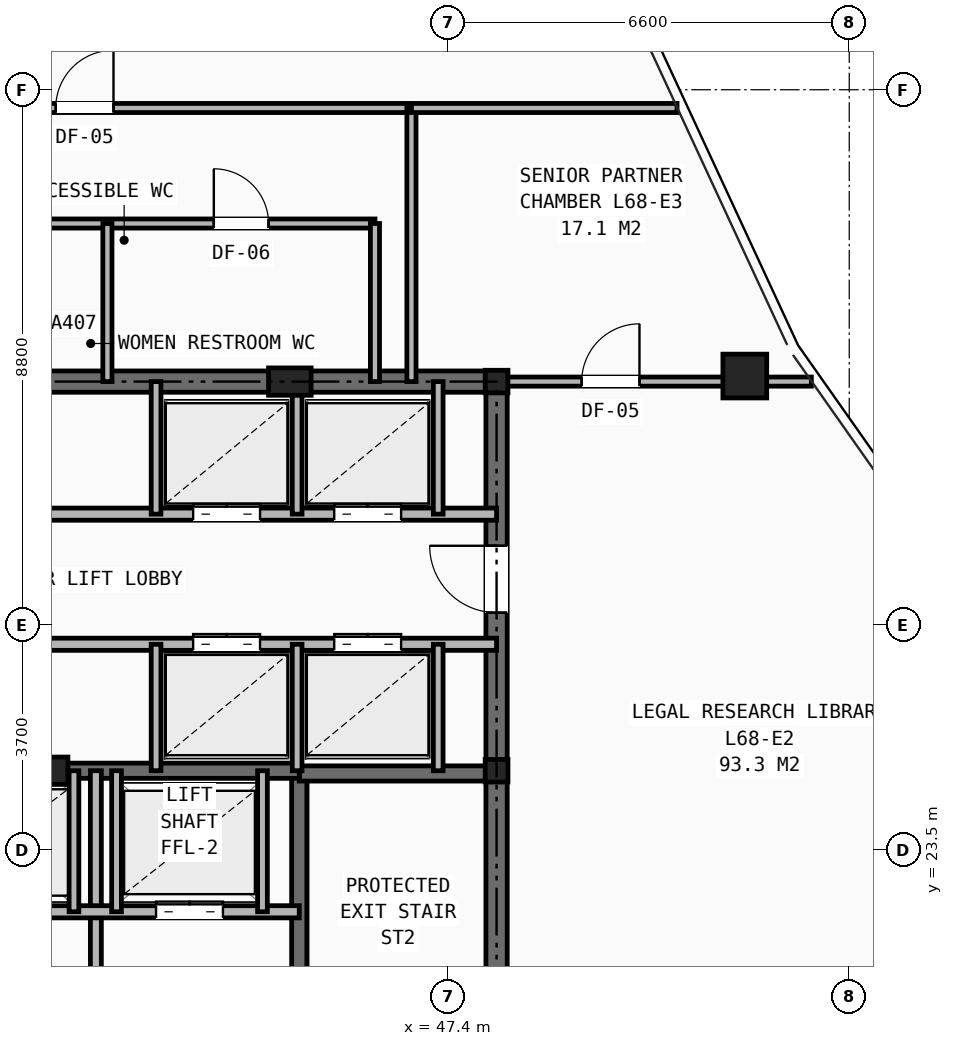
"""IFC4 building model, lengths in metres.
Left out: names, types, materials, properties, quantities, classifications, styles, units other than length and angle.
Written with IfcOpenShell. Run it as: python <this file> out.ifc"""

import sys

from ifc_helpers import new_model, si_unit, direction, frame, frame_2d, origin, origin_2d, place, context, subcontext, project, spatial, rectangle, hollow_rectangle, i_section, extrude, element, fill, save


model = new_model("IFC4")
c1 = context("Model", 3, precision=1e-05, world=origin(), true_north=direction((0.0, 1.0)))
c2 = subcontext(c1, "Body", "Model", "MODEL_VIEW")
j1 = project(units=[si_unit("LENGTHUNIT", "METRE"), si_unit("PLANEANGLEUNIT", "RADIAN")], contexts=[c1])
p1 = place(None, origin())
s1 = spatial("IfcSite", under=j1, at=p1, CompositionType="ELEMENT")
p2 = place(p1, origin())
s2 = spatial("IfcBuilding", under=s1, at=p2, CompositionType="ELEMENT")
p3 = place(p2, frame((0.0, 0.0, 239.9)))
s3 = spatial("IfcBuildingStorey", under=s2, at=p3, CompositionType="ELEMENT", Elevation=239.9)
for number, where, z_axis, x_axis in (
    (1, (48.2, 24.8, 0.0), (0.0, 0.0, 1.0), (1.0, 0.0, 0.0)),
    (2, (48.2, 31.2, 0.0), (0.0, 0.0, 1.0), (1.0, 0.0, 0.0)),
):
    element("IfcColumn", number, at=place(p3, frame(where, z_axis=z_axis, x_axis=x_axis)), inside=s3, PredefinedType="COLUMN", context=c2, shape_type="SweptSolid", body=[
        extrude(i_section(OverallWidth=0.374, OverallDepth=0.372, WebThickness=0.016, FlangeThickness=0.026, at=origin_2d()), origin(), (0.0, 0.0, 1.0), 3.5),
    ])
for number, where, z_axis, x_axis in (
    (3, (44.8, 31.2, 0.0), (0.0, 0.0, 1.0), (1.0, 0.0, 0.0)),
    (4, (40.8, 24.8, 0.0), (0.0, 0.0, 1.0), (1.0, 0.0, 0.0)),
):
    element("IfcColumn", number, at=place(p3, frame(where, z_axis=z_axis, x_axis=x_axis)), inside=s3, PredefinedType="PILASTER", context=c2, shape_type="SweptSolid", body=[
        extrude(rectangle(XDim=0.7, YDim=0.45, at=origin_2d()), origin(), (0.0, 0.0, 1.0), 3.5),
    ])
p4 = place(p3, frame((52.282, 31.291, 0.0), z_axis=(0.0, 0.0, 1.0), x_axis=(1.0, 0.0, 0.0)))
e5 = element("IfcColumn", 5, at=p4, inside=s3, PredefinedType="COLUMN", context=c2, shape_type="SweptSolid", body=[
    extrude(hollow_rectangle(XDim=0.72, YDim=0.72, WallThickness=0.05, at=origin_2d()), origin(), (0.0, 0.0, 1.0), 3.5),
])
p5 = place(p3, frame((31.8, 31.2, 0.0), z_axis=(0.0, 0.0, 1.0), x_axis=(1.0, 0.0, 0.0)))
e6 = element("IfcWall", 6, at=p5, inside=s3, PredefinedType="SHEAR", context=c2, shape_type="SweptSolid", body=[
    extrude(rectangle(XDim=16.4, YDim=0.35, at=frame_2d((8.2, 0.0))), origin(), (0.0, 0.0, 1.0), 3.25),
])
p6 = place(p3, frame((48.2, 16.4, 0.0), z_axis=(0.0, 0.0, 1.0), x_axis=(0.0, 1.0, 0.0)))
e7 = element("IfcWall", 7, at=p6, inside=s3, PredefinedType="SHEAR", context=c2, shape_type="SweptSolid", body=[
    extrude(rectangle(XDim=14.8, YDim=0.35, at=frame_2d((7.4, 0.0))), origin(), (0.0, 0.0, 1.0), 3.25),
])
p7 = place(p6, frame((11.0, 0.0, 0.0)))
e8 = element("IfcOpeningElement", 8, at=p7, cuts=e7, PredefinedType="OPENING", context=c2, shape_type="SweptSolid", body=[
    extrude(rectangle(XDim=1.1, YDim=2.15, at=frame_2d((0.55, 1.075))), frame((0.0, 0.185, 0.0), z_axis=(0.0, -1.0, 0.0), x_axis=(1.0, 0.0, 0.0)), (0.0, 0.0, 1.0), 0.37),
])
p8 = place(p3, frame((44.955, 16.4, 0.0), z_axis=(0.0, 0.0, 1.0), x_axis=(0.0, 1.0, 0.0)))
e9 = element("IfcWall", 9, at=p8, inside=s3, PredefinedType="SHEAR", context=c2, shape_type="SweptSolid", body=[
    extrude(rectangle(XDim=8.4, YDim=0.25, at=frame_2d((4.2, 0.0))), origin(), (0.0, 0.0, 1.0), 3.25),
])
p9 = place(p8, frame((0.45, 0.0, 0.0)))
e10 = element("IfcOpeningElement", 10, at=p9, cuts=e9, PredefinedType="OPENING", context=c2, shape_type="SweptSolid", body=[
    extrude(rectangle(XDim=0.95, YDim=2.1, at=frame_2d((0.475, 1.05))), frame((0.0, 0.135, 0.0), z_axis=(0.0, -1.0, 0.0), x_axis=(1.0, 0.0, 0.0)), (0.0, 0.0, 1.0), 0.27),
])
p10 = place(p3, frame((44.955, 24.755, 0.0), z_axis=(0.0, 0.0, 1.0), x_axis=(1.0, 0.0, 0.0)))
e11 = element("IfcWall", 11, at=p10, inside=s3, PredefinedType="SHEAR", context=c2, shape_type="SweptSolid", body=[
    extrude(rectangle(XDim=3.245, YDim=0.25, at=frame_2d((1.623, 0.0))), origin(), (0.0, 0.0, 1.0), 3.25),
])
p11 = place(p3, frame((35.045, 24.8, 0.0), z_axis=(0.0, 0.0, 1.0), x_axis=(1.0, 0.0, 0.0)))
e12 = element("IfcWall", 12, at=p11, inside=s3, PredefinedType="SHEAR", context=c2, shape_type="SweptSolid", body=[
    extrude(rectangle(XDim=9.91, YDim=0.25, at=frame_2d((4.955, 0.0))), origin(), (0.0, 0.0, 1.0), 3.25),
])
p12 = place(p3, frame((41.61, 16.4, 0.0), z_axis=(0.0, 0.0, 1.0), x_axis=(0.0, 1.0, 0.0)))
e13 = element("IfcWall", 13, at=p12, inside=s3, PredefinedType="PARTITIONING", context=c2, shape_type="SweptSolid", body=[
    extrude(rectangle(XDim=8.4, YDim=0.18, at=frame_2d((4.2, 0.0))), origin(), (0.0, 0.0, 1.0), 2.705),
])
p13 = place(p3, frame((35.045, 22.48, 0.0), z_axis=(0.0, 0.0, 1.0), x_axis=(1.0, 0.0, 0.0)))
e14 = element("IfcWall", 14, at=p13, inside=s3, PredefinedType="SOLIDWALL", context=c2, shape_type="SweptSolid", body=[
    extrude(rectangle(XDim=9.91, YDim=0.2, at=frame_2d((4.955, 0.0))), origin(), (0.0, 0.0, 1.0), 3.25),
])
p14 = place(p13, frame((1.255, 0.0, 0.0)))
e15 = element("IfcOpeningElement", 15, at=p14, cuts=e14, PredefinedType="OPENING", context=c2, shape_type="SweptSolid", body=[
    extrude(rectangle(XDim=1.1, YDim=2.15, at=frame_2d((0.55, 1.075))), frame((0.0, 0.11, 0.0), z_axis=(0.0, -1.0, 0.0), x_axis=(1.0, 0.0, 0.0)), (0.0, 0.0, 1.0), 0.22),
])
p15 = place(p13, frame((7.555, 0.0, 0.0)))
e16 = element("IfcOpeningElement", 16, at=p15, cuts=e14, PredefinedType="OPENING", context=c2, shape_type="SweptSolid", body=[
    extrude(rectangle(XDim=1.1, YDim=2.15, at=frame_2d((0.55, 1.075))), frame((0.0, 0.11, 0.0), z_axis=(0.0, -1.0, 0.0), x_axis=(1.0, 0.0, 0.0)), (0.0, 0.0, 1.0), 0.22),
])
p16 = place(p13, frame((4.405, 0.0, 0.0)))
e17 = element("IfcOpeningElement", 17, at=p16, cuts=e14, PredefinedType="OPENING", context=c2, shape_type="SweptSolid", body=[
    extrude(rectangle(XDim=1.1, YDim=2.15, at=frame_2d((0.55, 1.075))), frame((0.0, 0.11, 0.0), z_axis=(0.0, -1.0, 0.0), x_axis=(1.0, 0.0, 0.0)), (0.0, 0.0, 1.0), 0.22),
])
for number, where, z_axis, x_axis in (
    (18, (41.95, 22.48, 0.0), (0.0, 0.0, 1.0), (0.0, 1.0, 0.0)),
    (19, (44.35, 22.48, 0.0), (0.0, 0.0, 1.0), (0.0, 1.0, 0.0)),
    (20, (41.25, 22.48, 0.0), (0.0, 0.0, 1.0), (0.0, 1.0, 0.0)),
):
    element("IfcWall", number, at=place(p3, frame(where, z_axis=z_axis, x_axis=x_axis)), inside=s3, PredefinedType="SOLIDWALL", context=c2, shape_type="SweptSolid", body=[
        extrude(rectangle(XDim=2.32, YDim=0.16, at=frame_2d((1.16, 0.0))), origin(), (0.0, 0.0, 1.0), 3.25),
    ])
p17 = place(p3, frame((31.8, 29.02, 0.0), z_axis=(0.0, 0.0, 1.0), x_axis=(1.0, 0.0, 0.0)))
e21 = element("IfcWall", 21, at=p17, inside=s3, PredefinedType="SOLIDWALL", context=c2, shape_type="SweptSolid", body=[
    extrude(rectangle(XDim=16.4, YDim=0.2, at=frame_2d((8.2, 0.0))), origin(), (0.0, 0.0, 1.0), 2.705),
])
p18 = place(p17, frame((0.55, 0.0, 0.0)))
e22 = element("IfcOpeningElement", 22, at=p18, cuts=e21, PredefinedType="OPENING", context=c2, shape_type="SweptSolid", body=[
    extrude(rectangle(XDim=0.85, YDim=2.05, at=frame_2d((0.425, 1.025))), frame((0.0, 0.11, 0.0), z_axis=(0.0, -1.0, 0.0), x_axis=(1.0, 0.0, 0.0)), (0.0, 0.0, 1.0), 0.22),
])
p19 = place(p17, frame((5.94, 0.0, 0.0)))
e23 = element("IfcOpeningElement", 23, at=p19, cuts=e21, PredefinedType="OPENING", context=c2, shape_type="SweptSolid", body=[
    extrude(rectangle(XDim=0.9, YDim=2.1, at=frame_2d((0.45, 1.05))), frame((0.0, 0.11, 0.0), z_axis=(0.0, -1.0, 0.0), x_axis=(1.0, 0.0, 0.0)), (0.0, 0.0, 1.0), 0.22),
])
p20 = place(p17, frame((11.41, 0.0, 0.0)))
e24 = element("IfcOpeningElement", 24, at=p20, cuts=e21, PredefinedType="OPENING", context=c2, shape_type="SweptSolid", body=[
    extrude(rectangle(XDim=1.1, YDim=2.15, at=frame_2d((0.55, 1.075))), frame((0.0, 0.11, 0.0), z_axis=(0.0, -1.0, 0.0), x_axis=(1.0, 0.0, 0.0)), (0.0, 0.0, 1.0), 0.22),
])
p21 = place(p17, frame((13.73, 0.0, 0.0)))
e25 = element("IfcOpeningElement", 25, at=p21, cuts=e21, PredefinedType="OPENING", context=c2, shape_type="SweptSolid", body=[
    extrude(rectangle(XDim=1.1, YDim=2.15, at=frame_2d((0.55, 1.075))), frame((0.0, 0.11, 0.0), z_axis=(0.0, -1.0, 0.0), x_axis=(1.0, 0.0, 0.0)), (0.0, 0.0, 1.0), 0.22),
])
p22 = place(p3, frame((33.82, 26.88, 0.0), z_axis=(0.0, 0.0, 1.0), x_axis=(1.0, 0.0, 0.0)))
e26 = element("IfcWall", 26, at=p22, inside=s3, PredefinedType="SOLIDWALL", context=c2, shape_type="SweptSolid", body=[
    extrude(rectangle(XDim=14.38, YDim=0.2, at=frame_2d((7.19, 0.0))), origin(), (0.0, 0.0, 1.0), 2.705),
])
p23 = place(p22, frame((3.92, 0.0, 0.0)))
e27 = element("IfcOpeningElement", 27, at=p23, cuts=e26, PredefinedType="OPENING", context=c2, shape_type="SweptSolid", body=[
    extrude(rectangle(XDim=0.9, YDim=2.1, at=frame_2d((0.45, 1.05))), frame((0.0, 0.11, 0.0), z_axis=(0.0, -1.0, 0.0), x_axis=(1.0, 0.0, 0.0)), (0.0, 0.0, 1.0), 0.22),
])
p24 = place(p22, frame((9.39, 0.0, 0.0)))
e28 = element("IfcOpeningElement", 28, at=p24, cuts=e26, PredefinedType="OPENING", context=c2, shape_type="SweptSolid", body=[
    extrude(rectangle(XDim=1.1, YDim=2.15, at=frame_2d((0.55, 1.075))), frame((0.0, 0.11, 0.0), z_axis=(0.0, -1.0, 0.0), x_axis=(1.0, 0.0, 0.0)), (0.0, 0.0, 1.0), 0.22),
])
p25 = place(p22, frame((11.71, 0.0, 0.0)))
e29 = element("IfcOpeningElement", 29, at=p25, cuts=e26, PredefinedType="OPENING", context=c2, shape_type="SweptSolid", body=[
    extrude(rectangle(XDim=1.1, YDim=2.15, at=frame_2d((0.55, 1.075))), frame((0.0, 0.11, 0.0), z_axis=(0.0, -1.0, 0.0), x_axis=(1.0, 0.0, 0.0)), (0.0, 0.0, 1.0), 0.22),
])
for number, where, z_axis, x_axis in (
    (30, (42.6, 29.02, 0.0), (0.0, 0.0, 1.0), (0.0, 1.0, 0.0)),
    (31, (44.92, 29.02, 0.0), (0.0, 0.0, 1.0), (0.0, 1.0, 0.0)),
    (32, (47.24, 29.02, 0.0), (0.0, 0.0, 1.0), (0.0, 1.0, 0.0)),
):
    element("IfcWall", number, at=place(p3, frame(where, z_axis=z_axis, x_axis=x_axis)), inside=s3, PredefinedType="SOLIDWALL", context=c2, shape_type="SweptSolid", body=[
        extrude(rectangle(XDim=2.18, YDim=0.16, at=frame_2d((1.09, 0.0))), origin(), (0.0, 0.0, 1.0), 2.705),
    ])
for number, where, z_axis, x_axis in (
    (33, (42.6, 24.8, 0.0), (0.0, 0.0, 1.0), (0.0, 1.0, 0.0)),
    (34, (44.92, 24.8, 0.0), (0.0, 0.0, 1.0), (0.0, 1.0, 0.0)),
    (35, (47.24, 24.8, 0.0), (0.0, 0.0, 1.0), (0.0, 1.0, 0.0)),
):
    element("IfcWall", number, at=place(p3, frame(where, z_axis=z_axis, x_axis=x_axis)), inside=s3, PredefinedType="SOLIDWALL", context=c2, shape_type="SweptSolid", body=[
        extrude(rectangle(XDim=2.08, YDim=0.16, at=frame_2d((1.04, 0.0))), origin(), (0.0, 0.0, 1.0), 3.25),
    ])
p26 = place(p3, frame((33.2, 33.8, 0.0), z_axis=(0.0, 0.0, 1.0), x_axis=(1.0, 0.0, 0.0)))
e36 = element("IfcWall", 36, at=p26, inside=s3, PredefinedType="PARTITIONING", context=c2, shape_type="SweptSolid", body=[
    extrude(rectangle(XDim=13.0, YDim=0.15, at=frame_2d((6.5, 0.0))), origin(), (0.0, 0.0, 1.0), 3.25),
])
p27 = place(p26, frame((1.7, 0.0, 0.0)))
e37 = element("IfcOpeningElement", 37, at=p27, cuts=e36, PredefinedType="OPENING", context=c2, shape_type="SweptSolid", body=[
    extrude(rectangle(XDim=0.9, YDim=2.1, at=frame_2d((0.45, 1.05))), frame((0.0, 0.085, 0.0), z_axis=(0.0, -1.0, 0.0), x_axis=(1.0, 0.0, 0.0)), (0.0, 0.0, 1.0), 0.17),
])
p28 = place(p26, frame((6.0, 0.0, 0.0)))
e38 = element("IfcOpeningElement", 38, at=p28, cuts=e36, PredefinedType="OPENING", context=c2, shape_type="SweptSolid", body=[
    extrude(rectangle(XDim=0.9, YDim=2.1, at=frame_2d((0.45, 1.05))), frame((0.0, 0.085, 0.0), z_axis=(0.0, -1.0, 0.0), x_axis=(1.0, 0.0, 0.0)), (0.0, 0.0, 1.0), 0.17),
])
p29 = place(p26, frame((10.35, 0.0, 0.0)))
e39 = element("IfcOpeningElement", 39, at=p29, cuts=e36, PredefinedType="OPENING", context=c2, shape_type="SweptSolid", body=[
    extrude(rectangle(XDim=0.9, YDim=2.1, at=frame_2d((0.45, 1.05))), frame((0.0, 0.085, 0.0), z_axis=(0.0, -1.0, 0.0), x_axis=(1.0, 0.0, 0.0)), (0.0, 0.0, 1.0), 0.17),
])
for number, where, z_axis, x_axis in (
    (40, (46.2, 31.2, 0.0), (0.0, 0.0, 1.0), (0.0, 1.0, 0.0)),
    (41, (41.8, 31.2, 0.0), (0.0, 0.0, 1.0), (0.0, 1.0, 0.0)),
):
    element("IfcWall", number, at=place(p3, frame(where, z_axis=z_axis, x_axis=x_axis)), inside=s3, PredefinedType="PARTITIONING", context=c2, shape_type="SweptSolid", body=[
        extrude(rectangle(XDim=2.6, YDim=0.15, at=frame_2d((1.3, 0.0))), origin(), (0.0, 0.0, 1.0), 2.705),
    ])
p30 = place(p3, frame((40.75, 35.7, 0.0), z_axis=(0.0, 0.0, 1.0), x_axis=(1.0, 0.0, 0.0)))
e42 = element("IfcWall", 42, at=p30, inside=s3, PredefinedType="PARTITIONING", context=c2, shape_type="SweptSolid", body=[
    extrude(rectangle(XDim=6.05, YDim=0.15, at=frame_2d((3.025, 0.0))), origin(), (0.0, 0.0, 1.0), 3.25),
])
p31 = place(p30, frame((0.2, 0.0, 0.0)))
e43 = element("IfcOpeningElement", 43, at=p31, cuts=e42, PredefinedType="OPENING", context=c2, shape_type="SweptSolid", body=[
    extrude(rectangle(XDim=0.95, YDim=2.1, at=frame_2d((0.475, 1.05))), frame((0.0, 0.085, 0.0), z_axis=(0.0, -1.0, 0.0), x_axis=(1.0, 0.0, 0.0)), (0.0, 0.0, 1.0), 0.17),
])
p32 = place(p3, frame((46.8, 31.2, 0.0), z_axis=(0.0, 0.0, 1.0), x_axis=(0.0, 1.0, 0.0)))
e44 = element("IfcWall", 44, at=p32, inside=s3, PredefinedType="PARTITIONING", context=c2, shape_type="SweptSolid", body=[
    extrude(rectangle(XDim=4.5, YDim=0.15, at=frame_2d((2.25, 0.0))), origin(), (0.0, 0.0, 1.0), 2.705),
])
p33 = place(p3, frame((46.8, 35.7, 0.0), z_axis=(0.0, 0.0, 1.0), x_axis=(1.0, 0.0, 0.0)))
e45 = element("IfcWall", 45, at=p33, inside=s3, PredefinedType="PARTITIONING", context=c2, shape_type="SweptSolid", body=[
    extrude(rectangle(XDim=4.368, YDim=0.15, at=frame_2d((2.184, 0.0))), origin(), (0.0, 0.0, 1.0), 2.628),
])
p34 = place(p3, frame((48.2, 31.2, 0.0), z_axis=(0.0, 0.0, 1.0), x_axis=(1.0, 0.0, 0.0)))
e46 = element("IfcWall", 46, at=p34, inside=s3, PredefinedType="PARTITIONING", context=c2, shape_type="SweptSolid", body=[
    extrude(rectangle(XDim=5.177, YDim=0.15, at=frame_2d((2.589, 0.0))), origin(), (0.0, 0.0, 1.0), 2.265),
])
p35 = place(p34, frame((1.4, 0.0, 0.0)))
e47 = element("IfcOpeningElement", 47, at=p35, cuts=e46, PredefinedType="OPENING", context=c2, shape_type="SweptSolid", body=[
    extrude(rectangle(XDim=0.95, YDim=2.1, at=frame_2d((0.475, 1.05))), frame((0.0, 0.085, 0.0), z_axis=(0.0, -1.0, 0.0), x_axis=(1.0, 0.0, 0.0)), (0.0, 0.0, 1.0), 0.17),
])
p36 = place(p15, origin())
e48 = element("IfcDoor", 48, at=p36, inside=s3, OperationType="DOUBLE_DOOR_SLIDING", PredefinedType="DOOR", context=c2, shape_type="SweptSolid", body=[
    extrude(rectangle(XDim=1.1, YDim=2.15, at=frame_2d((0.55, 1.075))), frame((0.0, 0.025, 0.0), z_axis=(0.0, -1.0, 0.0), x_axis=(1.0, 0.0, 0.0)), (0.0, 0.0, 1.0), 0.05),
])
fill(e16, e48)
p37 = place(p7, origin())
e49 = element("IfcDoor", 49, at=p37, inside=s3, OperationType="SINGLE_SWING_RIGHT", PredefinedType="DOOR", context=c2, shape_type="SweptSolid", body=[
    extrude(rectangle(XDim=1.1, YDim=2.15, at=frame_2d((0.55, 1.075))), frame((0.0, 0.025, 0.0), z_axis=(0.0, -1.0, 0.0), x_axis=(1.0, 0.0, 0.0)), (0.0, 0.0, 1.0), 0.05),
])
fill(e8, e49)
p38 = place(p20, origin())
e50 = element("IfcDoor", 50, at=p38, inside=s3, OperationType="DOUBLE_DOOR_SLIDING", PredefinedType="DOOR", context=c2, shape_type="SweptSolid", body=[
    extrude(rectangle(XDim=1.1, YDim=2.15, at=frame_2d((0.55, 1.075))), frame((0.0, 0.025, 0.0), z_axis=(0.0, -1.0, 0.0), x_axis=(1.0, 0.0, 0.0)), (0.0, 0.0, 1.0), 0.05),
])
fill(e24, e50)
p39 = place(p21, origin())
e51 = element("IfcDoor", 51, at=p39, inside=s3, OperationType="DOUBLE_DOOR_SLIDING", PredefinedType="DOOR", context=c2, shape_type="SweptSolid", body=[
    extrude(rectangle(XDim=1.1, YDim=2.15, at=frame_2d((0.55, 1.075))), frame((0.0, 0.025, 0.0), z_axis=(0.0, -1.0, 0.0), x_axis=(1.0, 0.0, 0.0)), (0.0, 0.0, 1.0), 0.05),
])
fill(e25, e51)
p40 = place(p24, origin())
e52 = element("IfcDoor", 52, at=p40, inside=s3, OperationType="DOUBLE_DOOR_SLIDING", PredefinedType="DOOR", context=c2, shape_type="SweptSolid", body=[
    extrude(rectangle(XDim=1.1, YDim=2.15, at=frame_2d((0.55, 1.075))), frame((0.0, 0.025, 0.0), z_axis=(0.0, -1.0, 0.0), x_axis=(1.0, 0.0, 0.0)), (0.0, 0.0, 1.0), 0.05),
])
fill(e28, e52)
p41 = place(p25, origin())
e53 = element("IfcDoor", 53, at=p41, inside=s3, OperationType="DOUBLE_DOOR_SLIDING", PredefinedType="DOOR", context=c2, shape_type="SweptSolid", body=[
    extrude(rectangle(XDim=1.1, YDim=2.15, at=frame_2d((0.55, 1.075))), frame((0.0, 0.025, 0.0), z_axis=(0.0, -1.0, 0.0), x_axis=(1.0, 0.0, 0.0)), (0.0, 0.0, 1.0), 0.05),
])
fill(e29, e53)
p42 = place(p29, origin())
e54 = element("IfcDoor", 54, at=p42, inside=s3, OperationType="SINGLE_SWING_LEFT", PredefinedType="DOOR", context=c2, shape_type="SweptSolid", body=[
    extrude(rectangle(XDim=0.9, YDim=2.1, at=frame_2d((0.45, 1.05))), frame((0.0, 0.025, 0.0), z_axis=(0.0, -1.0, 0.0), x_axis=(1.0, 0.0, 0.0)), (0.0, 0.0, 1.0), 0.05),
])
fill(e39, e54)
p43 = place(p35, origin())
e55 = element("IfcDoor", 55, at=p43, inside=s3, OperationType="SINGLE_SWING_RIGHT", PredefinedType="DOOR", context=c2, shape_type="SweptSolid", body=[
    extrude(rectangle(XDim=0.95, YDim=2.1, at=frame_2d((0.475, 1.05))), frame((0.0, 0.025, 0.0), z_axis=(0.0, -1.0, 0.0), x_axis=(1.0, 0.0, 0.0)), (0.0, 0.0, 1.0), 0.05),
])
fill(e47, e55)
p44 = place(p31, origin())
e56 = element("IfcDoor", 56, at=p44, inside=s3, OperationType="SINGLE_SWING_RIGHT", PredefinedType="DOOR", context=c2, shape_type="SweptSolid", body=[
    extrude(rectangle(XDim=0.95, YDim=2.1, at=frame_2d((0.475, 1.05))), frame((0.0, 0.025, 0.0), z_axis=(0.0, -1.0, 0.0), x_axis=(1.0, 0.0, 0.0)), (0.0, 0.0, 1.0), 0.05),
])
fill(e43, e56)
save(model, sys.argv[1])
